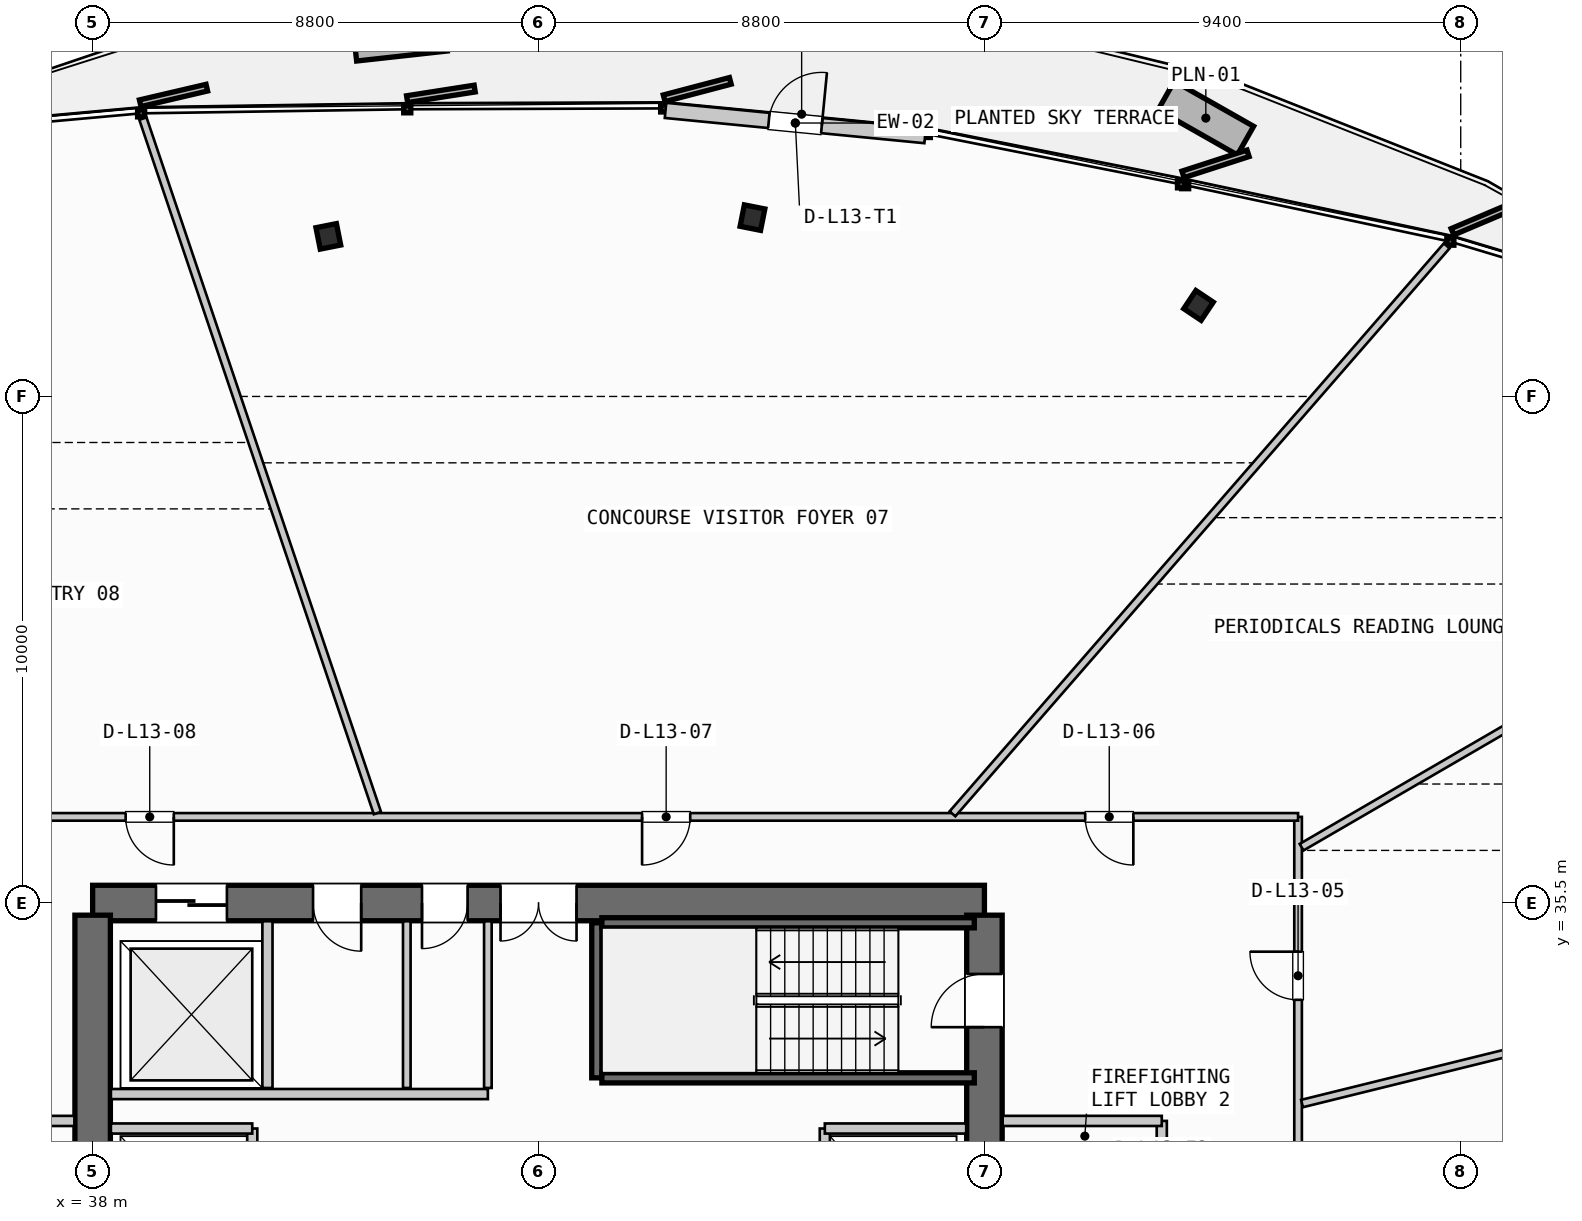
"""IFC4 building model, lengths in metres.
Left out: names, types, materials, properties, quantities, classifications, styles, units other than length and angle.
Written with IfcOpenShell. Run it as: python <this file> out.ifc"""

import sys

from ifc_helpers import new_model, si_unit, direction, frame, frame_2d, origin, origin_2d, place, context, subcontext, project, spatial, rectangle, i_section, extrude, source, transform, mapped, element, fill, save


model = new_model("IFC4")
c1 = context("Model", 3, precision=1e-05, world=origin(), true_north=direction((0.0, 1.0)))
c2 = subcontext(c1, "Body", "Model", "MODEL_VIEW")
j1 = project(units=[si_unit("LENGTHUNIT", "METRE"), si_unit("PLANEANGLEUNIT", "RADIAN")], contexts=[c1])
p1 = place(None, origin())
s1 = spatial("IfcSite", under=j1, at=p1, CompositionType="ELEMENT")
p2 = place(p1, origin())
s2 = spatial("IfcBuilding", under=s1, at=p2, CompositionType="ELEMENT")
p3 = place(p2, frame((0.0, 0.0, 56.2)))
s3 = spatial("IfcBuildingStorey", under=s2, at=p3, CompositionType="ELEMENT", Elevation=56.2)
p4 = place(p3, frame((55.6, 35.5, 0.0), z_axis=(0.0, 0.0, 1.0), x_axis=(-1.0, 0.0, 0.0)))
e1 = element("IfcWall", 1, at=p4, inside=s3, PredefinedType="SHEAR", context=c2, shape_type="SweptSolid", body=[
    extrude(rectangle(XDim=17.6, YDim=0.7, at=frame_2d((8.8, 0.0))), origin(), (0.0, 0.0, 1.0), 3.55),
])
p5 = place(p4, frame((8.05, 0.0, 0.0)))
e2 = element("IfcOpeningElement", 2, at=p5, cuts=e1, PredefinedType="OPENING", context=c2, shape_type="SweptSolid", body=[
    extrude(rectangle(XDim=1.5, YDim=2.2, at=frame_2d((0.75, 1.1))), frame((0.0, 0.36, 0.0), z_axis=(0.0, -1.0, 0.0), x_axis=(1.0, 0.0, 0.0)), (0.0, 0.0, 1.0), 0.72),
])
p6 = place(p4, frame((14.95, 0.0, 0.0)))
e3 = element("IfcOpeningElement", 3, at=p6, cuts=e1, PredefinedType="OPENING", context=c2, shape_type="SweptSolid", body=[
    extrude(rectangle(XDim=1.4, YDim=2.3, at=frame_2d((0.7, 1.15))), frame((0.0, 0.36, 0.0), z_axis=(0.0, -1.0, 0.0), x_axis=(1.0, 0.0, 0.0)), (0.0, 0.0, 1.0), 0.72),
])
p7 = place(p4, frame((12.3, 0.0, 0.0)))
e4 = element("IfcOpeningElement", 4, at=p7, cuts=e1, PredefinedType="OPENING", context=c2, shape_type="SweptSolid", body=[
    extrude(rectangle(XDim=0.95, YDim=2.15, at=frame_2d((0.475, 1.075))), frame((0.0, 0.36, 0.0), z_axis=(0.0, -1.0, 0.0), x_axis=(1.0, 0.0, 0.0)), (0.0, 0.0, 1.0), 0.72),
])
p8 = place(p4, frame((10.2, 0.0, 0.0)))
e5 = element("IfcOpeningElement", 5, at=p8, cuts=e1, PredefinedType="OPENING", context=c2, shape_type="SweptSolid", body=[
    extrude(rectangle(XDim=0.9, YDim=2.15, at=frame_2d((0.45, 1.075))), frame((0.0, 0.36, 0.0), z_axis=(0.0, -1.0, 0.0), x_axis=(1.0, 0.0, 0.0)), (0.0, 0.0, 1.0), 0.72),
])
p9 = place(p3, frame((38.0, 35.26, 0.0), z_axis=(0.0, 0.0, 1.0), x_axis=(0.0, -1.0, 0.0)))
e6 = element("IfcWall", 6, at=p9, inside=s3, PredefinedType="SHEAR", context=c2, shape_type="SweptSolid", body=[
    extrude(rectangle(XDim=14.92, YDim=0.7, at=frame_2d((7.46, 0.0))), origin(), (0.0, 0.0, 1.0), 3.55),
])
p10 = place(p9, frame((5.21, 0.0, 0.0)))
e7 = element("IfcOpeningElement", 7, at=p10, cuts=e6, PredefinedType="OPENING", context=c2, shape_type="SweptSolid", body=[
    extrude(rectangle(XDim=1.1, YDim=2.2, at=frame_2d((0.55, 1.1))), frame((0.0, 0.36, 0.0), z_axis=(0.0, -1.0, 0.0), x_axis=(1.0, 0.0, 0.0)), (0.0, 0.0, 1.0), 0.72),
])
p11 = place(p3, frame((55.6, 20.34, 0.0), z_axis=(0.0, 0.0, 1.0), x_axis=(0.0, 1.0, 0.0)))
e8 = element("IfcWall", 8, at=p11, inside=s3, PredefinedType="SHEAR", context=c2, shape_type="SweptSolid", body=[
    extrude(rectangle(XDim=14.92, YDim=0.7, at=frame_2d((7.46, 0.0))), origin(), (0.0, 0.0, 1.0), 3.55),
])
p12 = place(p11, frame((12.71, 0.0, 0.0)))
e9 = element("IfcOpeningElement", 9, at=p12, cuts=e8, PredefinedType="OPENING", context=c2, shape_type="SweptSolid", body=[
    extrude(rectangle(XDim=1.05, YDim=2.15, at=frame_2d((0.525, 1.075))), frame((0.0, 0.36, 0.0), z_axis=(0.0, -1.0, 0.0), x_axis=(1.0, 0.0, 0.0)), (0.0, 0.0, 1.0), 0.72),
])
p13 = place(p11, frame((8.61, 0.0, 0.0)))
e10 = element("IfcOpeningElement", 10, at=p13, cuts=e8, PredefinedType="OPENING", context=c2, shape_type="SweptSolid", body=[
    extrude(rectangle(XDim=1.1, YDim=2.2, at=frame_2d((0.55, 1.1))), frame((0.0, 0.36, 0.0), z_axis=(0.0, -1.0, 0.0), x_axis=(1.0, 0.0, 0.0)), (0.0, 0.0, 1.0), 0.72),
])
m1 = source(origin(), c2, "Body", "SweptSolid", [
    extrude(i_section(OverallWidth=0.412, OverallDepth=0.431, WebThickness=0.042, FlangeThickness=0.068, FilletRadius=0.015, at=origin_2d()), origin(), (0.0, 0.0, 1.0), 3.55),
])
for number, where, z_axis, x_axis in (
    (11, (59.825, 47.293, 0.0), (0.0, 0.0, 1.0), (0.556, 0.831, 0.0)),
    (12, (51.022, 49.026, 0.0), (0.0, 0.0, 1.0), (0.195, 0.981, 0.0)),
    (13, (42.652, 48.656, 0.0), (0.0, 0.0, 1.0), (-0.195, 0.981, 0.0)),
):
    element("IfcColumn", number, at=place(p3, frame(where, z_axis=z_axis, x_axis=x_axis)), inside=s3, PredefinedType="COLUMN", context=c2, shape_type="MappedRepresentation", body=[
        mapped(m1, transform((0.0, 0.0, 0.0), scale=1.0)),
    ])
p14 = place(p3, frame((49.306, 51.142, 0.0), z_axis=(0.0, 0.0, 1.0), x_axis=(0.995308557382, -0.096751618082, 0.0)))
e14 = element("IfcWall", 14, at=p14, inside=s3, PredefinedType="SOLIDWALL", context=c2, shape_type="SweptSolid", body=[
    extrude(rectangle(XDim=5.148, YDim=0.3, at=frame_2d((2.574, 0.0))), origin(), (0.0, 0.0, 1.0), 2.925),
])
p15 = place(p14, frame((2.049, 0.0, 0.0)))
e15 = element("IfcOpeningElement", 15, at=p15, cuts=e14, PredefinedType="OPENING", context=c2, shape_type="SweptSolid", body=[
    extrude(rectangle(XDim=1.05, YDim=2.2, at=frame_2d((0.525, 1.1))), frame((0.0, 0.16, 0.0), z_axis=(0.0, -1.0, 0.0), x_axis=(1.0, 0.0, 0.0)), (0.0, 0.0, 1.0), 0.32),
])
p16 = place(p3, frame((47.95, 32.05, 0.0), z_axis=(0.0, 0.0, 1.0), x_axis=(0.0, 1.0, 0.0)))
e16 = element("IfcWall", 16, at=p16, inside=s3, PredefinedType="SHEAR", context=c2, shape_type="SweptSolid", body=[
    extrude(rectangle(XDim=3.06, YDim=0.2, at=frame_2d((1.53, 0.0))), origin(), (0.0, 0.0, 1.0), 3.55),
])
for number, where, z_axis, x_axis in (
    (17, (48.05, 35.11, 0.0), (0.0, 0.0, 1.0), (1.0, 0.0, 0.0)),
    (18, (55.4, 32.05, 0.0), (0.0, 0.0, 1.0), (-1.0, 0.0, 0.0)),
):
    element("IfcWall", number, at=place(p3, frame(where, z_axis=z_axis, x_axis=x_axis)), inside=s3, PredefinedType="SHEAR", context=c2, shape_type="SweptSolid", body=[
        extrude(rectangle(XDim=7.35, YDim=0.2, at=frame_2d((3.675, 0.0))), origin(), (0.0, 0.0, 1.0), 3.55),
    ])
p17 = place(p3, frame((41.15, 27.95, 0.0), z_axis=(0.0, 0.0, 1.0), x_axis=(0.0, 1.0, 0.0)))
e19 = element("IfcWall", 19, at=p17, inside=s3, PredefinedType="PARTITIONING", context=c2, shape_type="SweptSolid", body=[
    extrude(rectangle(XDim=3.1, YDim=0.2, at=frame_2d((1.55, 0.0))), origin(), (0.0, 0.0, 1.0), 2.645),
])
p18 = place(p3, frame((38.36, 31.05, 0.0), z_axis=(0.0, 0.0, 1.0), x_axis=(1.0, 0.0, 0.0)))
e20 = element("IfcWall", 20, at=p18, inside=s3, PredefinedType="PARTITIONING", context=c2, shape_type="SweptSolid", body=[
    extrude(rectangle(XDim=2.79, YDim=0.2, at=frame_2d((1.395, 0.0))), origin(), (0.0, 0.0, 1.0), 2.645),
])
p19 = place(p3, frame((34.5, 31.2, 0.0), z_axis=(0.0, 0.0, 1.0), x_axis=(1.0, 0.0, 0.0)))
e21 = element("IfcWall", 21, at=p19, inside=s3, PredefinedType="PARTITIONING", context=c2, shape_type="SweptSolid", body=[
    extrude(rectangle(XDim=3.14, YDim=0.2, at=frame_2d((1.57, 0.0))), origin(), (0.0, 0.0, 1.0), 2.645),
])
p20 = place(p3, frame((52.45, 27.95, 0.0), z_axis=(0.0, 0.0, 1.0), x_axis=(0.0, 1.0, 0.0)))
e22 = element("IfcWall", 22, at=p20, inside=s3, PredefinedType="PARTITIONING", context=c2, shape_type="SweptSolid", body=[
    extrude(rectangle(XDim=3.1, YDim=0.2, at=frame_2d((1.55, 0.0))), origin(), (0.0, 0.0, 1.0), 2.645),
])
p21 = place(p3, frame((52.45, 31.05, 0.0), z_axis=(0.0, 0.0, 1.0), x_axis=(1.0, 0.0, 0.0)))
e23 = element("IfcWall", 23, at=p21, inside=s3, PredefinedType="PARTITIONING", context=c2, shape_type="SweptSolid", body=[
    extrude(rectangle(XDim=2.79, YDim=0.2, at=frame_2d((1.395, 0.0))), origin(), (0.0, 0.0, 1.0), 2.645),
])
p22 = place(p3, frame((59.1, 26.8, 0.0), z_axis=(0.0, 0.0, 1.0), x_axis=(0.0, 1.0, 0.0)))
e24 = element("IfcWall", 24, at=p22, inside=s3, PredefinedType="PARTITIONING", context=c2, shape_type="SweptSolid", body=[
    extrude(rectangle(XDim=4.4, YDim=0.2, at=frame_2d((2.2, 0.0))), origin(), (0.0, 0.0, 1.0), 2.645),
])
p23 = place(p22, frame((1.65, 0.0, 0.0)))
e25 = element("IfcOpeningElement", 25, at=p23, cuts=e24, PredefinedType="OPENING", context=c2, shape_type="SweptSolid", body=[
    extrude(rectangle(XDim=1.05, YDim=2.15, at=frame_2d((0.525, 1.075))), frame((0.0, 0.11, 0.0), z_axis=(0.0, -1.0, 0.0), x_axis=(1.0, 0.0, 0.0)), (0.0, 0.0, 1.0), 0.22),
])
p24 = place(p3, frame((55.96, 31.2, 0.0), z_axis=(0.0, 0.0, 1.0), x_axis=(1.0, 0.0, 0.0)))
e26 = element("IfcWall", 26, at=p24, inside=s3, PredefinedType="PARTITIONING", context=c2, shape_type="SweptSolid", body=[
    extrude(rectangle(XDim=3.14, YDim=0.2, at=frame_2d((1.57, 0.0))), origin(), (0.0, 0.0, 1.0), 2.645),
])
p25 = place(p3, frame((41.45, 31.85, 0.0), z_axis=(0.0, 0.0, 1.0), x_axis=(0.0, 1.0, 0.0)))
e27 = element("IfcWall", 27, at=p25, inside=s3, PredefinedType="PARTITIONING", context=c2, shape_type="SweptSolid", body=[
    extrude(rectangle(XDim=3.29, YDim=0.2, at=frame_2d((1.645, 0.0))), origin(), (0.0, 0.0, 1.0), 2.645),
])
p26 = place(p3, frame((38.36, 31.73, 0.0), z_axis=(0.0, 0.0, 1.0), x_axis=(1.0, 0.0, 0.0)))
e28 = element("IfcWall", 28, at=p26, inside=s3, PredefinedType="PARTITIONING", context=c2, shape_type="SweptSolid", body=[
    extrude(rectangle(XDim=7.44, YDim=0.2, at=frame_2d((3.72, 0.0))), origin(), (0.0, 0.0, 1.0), 2.645),
])
p27 = place(p3, frame((45.8, 31.85, 0.0), z_axis=(0.0, 0.0, 1.0), x_axis=(0.0, 1.0, 0.0)))
e29 = element("IfcWall", 29, at=p27, inside=s3, PredefinedType="PARTITIONING", context=c2, shape_type="SweptSolid", body=[
    extrude(rectangle(XDim=3.29, YDim=0.15, at=frame_2d((1.645, 0.0))), origin(), (0.0, 0.0, 1.0), 2.645),
])
p28 = place(p3, frame((44.2, 31.85, 0.0), z_axis=(0.0, 0.0, 1.0), x_axis=(0.0, 1.0, 0.0)))
e30 = element("IfcWall", 30, at=p28, inside=s3, PredefinedType="PLUMBINGWALL", context=c2, shape_type="SweptSolid", body=[
    extrude(rectangle(XDim=3.29, YDim=0.15, at=frame_2d((1.645, 0.0))), origin(), (0.0, 0.0, 1.0), 2.645),
])
p29 = place(p3, frame((61.79, 17.98, 0.0), z_axis=(0.0, 0.0, 1.0), x_axis=(0.0, 1.0, 0.0)))
e31 = element("IfcWall", 31, at=p29, inside=s3, PredefinedType="PARTITIONING", context=c2, shape_type="SweptSolid", body=[
    extrude(rectangle(XDim=19.22, YDim=0.15, at=frame_2d((9.61, 0.0))), origin(), (0.0, 0.0, 1.0), 2.645),
])
p30 = place(p29, frame((2.332, 0.0, 0.0)))
e32 = element("IfcOpeningElement", 32, at=p30, cuts=e31, PredefinedType="OPENING", context=c2, shape_type="SweptSolid", body=[
    extrude(rectangle(XDim=0.95, YDim=2.15, at=frame_2d((0.475, 1.075))), frame((0.0, 0.085, 0.0), z_axis=(0.0, -1.0, 0.0), x_axis=(1.0, 0.0, 0.0)), (0.0, 0.0, 1.0), 0.17),
])
p31 = place(p29, frame((8.811, 0.0, 0.0)))
e33 = element("IfcOpeningElement", 33, at=p31, cuts=e31, PredefinedType="OPENING", context=c2, shape_type="SweptSolid", body=[
    extrude(rectangle(XDim=0.95, YDim=2.15, at=frame_2d((0.475, 1.075))), frame((0.0, 0.085, 0.0), z_axis=(0.0, -1.0, 0.0), x_axis=(1.0, 0.0, 0.0)), (0.0, 0.0, 1.0), 0.17),
])
p32 = place(p29, frame((15.61, 0.0, 0.0)))
e34 = element("IfcOpeningElement", 34, at=p32, cuts=e31, PredefinedType="OPENING", context=c2, shape_type="SweptSolid", body=[
    extrude(rectangle(XDim=0.95, YDim=2.15, at=frame_2d((0.475, 1.075))), frame((0.0, 0.085, 0.0), z_axis=(0.0, -1.0, 0.0), x_axis=(1.0, 0.0, 0.0)), (0.0, 0.0, 1.0), 0.17),
])
p33 = place(p3, frame((61.79, 37.2, 0.0), z_axis=(0.0, 0.0, 1.0), x_axis=(-1.0, 0.0, 0.0)))
e35 = element("IfcWall", 35, at=p33, inside=s3, PredefinedType="PARTITIONING", context=c2, shape_type="SweptSolid", body=[
    extrude(rectangle(XDim=29.98, YDim=0.15, at=frame_2d((14.99, 0.0))), origin(), (0.0, 0.0, 1.0), 2.645),
])
p34 = place(p33, frame((3.251, 0.0, 0.0)))
e36 = element("IfcOpeningElement", 36, at=p34, cuts=e35, PredefinedType="OPENING", context=c2, shape_type="SweptSolid", body=[
    extrude(rectangle(XDim=0.95, YDim=2.15, at=frame_2d((0.475, 1.075))), frame((0.0, 0.085, 0.0), z_axis=(0.0, -1.0, 0.0), x_axis=(1.0, 0.0, 0.0)), (0.0, 0.0, 1.0), 0.17),
])
p35 = place(p33, frame((11.996, 0.0, 0.0)))
e37 = element("IfcOpeningElement", 37, at=p35, cuts=e35, PredefinedType="OPENING", context=c2, shape_type="SweptSolid", body=[
    extrude(rectangle(XDim=0.95, YDim=2.15, at=frame_2d((0.475, 1.075))), frame((0.0, 0.085, 0.0), z_axis=(0.0, -1.0, 0.0), x_axis=(1.0, 0.0, 0.0)), (0.0, 0.0, 1.0), 0.17),
])
p36 = place(p33, frame((22.188, 0.0, 0.0)))
e38 = element("IfcOpeningElement", 38, at=p36, cuts=e35, PredefinedType="OPENING", context=c2, shape_type="SweptSolid", body=[
    extrude(rectangle(XDim=0.95, YDim=2.15, at=frame_2d((0.475, 1.075))), frame((0.0, 0.085, 0.0), z_axis=(0.0, -1.0, 0.0), x_axis=(1.0, 0.0, 0.0)), (0.0, 0.0, 1.0), 0.17),
])
p37 = place(p3, frame((61.868, 31.543, 0.0), z_axis=(0.0, 0.0, 1.0), x_axis=(0.970877515326, 0.23957639749, 0.0)))
e39 = element("IfcWall", 39, at=p37, inside=s3, PredefinedType="PARTITIONING", context=c2, shape_type="SweptSolid", body=[
    extrude(rectangle(XDim=17.885, YDim=0.15, at=frame_2d((8.943, 0.0))), origin(), (0.0, 0.0, 1.0), 2.645),
])
p38 = place(p3, frame((61.859, 36.602, 0.0), z_axis=(0.0, 0.0, 1.0), x_axis=(0.864825995499, 0.502071705544, 0.0)))
e40 = element("IfcWall", 40, at=p38, inside=s3, PredefinedType="PARTITIONING", context=c2, shape_type="SweptSolid", body=[
    extrude(rectangle(XDim=14.03, YDim=0.15, at=frame_2d((7.015, 0.0))), origin(), (0.0, 0.0, 1.0), 2.645),
])
p39 = place(p3, frame((54.969, 37.26, 0.0), z_axis=(0.0, 0.0, 1.0), x_axis=(0.656478076952, 0.754345103041, 0.0)))
e41 = element("IfcWall", 41, at=p39, inside=s3, PredefinedType="PARTITIONING", context=c2, shape_type="SweptSolid", body=[
    extrude(rectangle(XDim=14.858, YDim=0.15, at=frame_2d((7.429, 0.0))), origin(), (0.0, 0.0, 1.0), 2.645),
])
p40 = place(p3, frame((43.62, 37.276, 0.0), z_axis=(0.0, 0.0, 1.0), x_axis=(-0.319942102515, 0.947437096085, 0.0)))
e42 = element("IfcWall", 42, at=p40, inside=s3, PredefinedType="PARTITIONING", context=c2, shape_type="SweptSolid", body=[
    extrude(rectangle(XDim=14.464, YDim=0.15, at=frame_2d((7.232, 0.0))), origin(), (0.0, 0.0, 1.0), 2.645),
])
m2 = source(origin(), c2, "Body", "SweptSolid", [
    extrude(rectangle(XDim=1.05, YDim=2.2, at=frame_2d((0.525, 1.1))), frame((0.0, 0.025, 0.0), z_axis=(0.0, -1.0, 0.0), x_axis=(1.0, 0.0, 0.0)), (0.0, 0.0, 1.0), 0.05),
])
p41 = place(p15, origin())
e43 = element("IfcDoor", 43, at=p41, inside=s3, OperationType="SINGLE_SWING_RIGHT", PredefinedType="DOOR", context=c2, shape_type="MappedRepresentation", body=[
    mapped(m2, transform((0.0, 0.0, 0.0), scale=1.0)),
])
fill(e15, e43)
m3 = source(origin(), c2, "Body", "SweptSolid", [
    extrude(rectangle(XDim=1.05, YDim=2.15, at=frame_2d((0.525, 1.075))), frame((0.0, 0.025, 0.0), z_axis=(0.0, -1.0, 0.0), x_axis=(1.0, 0.0, 0.0)), (0.0, 0.0, 1.0), 0.05),
])
p42 = place(p12, origin())
e44 = element("IfcDoor", 44, at=p42, inside=s3, OperationType="SINGLE_SWING_LEFT", PredefinedType="DOOR", context=c2, shape_type="MappedRepresentation", body=[
    mapped(m3, transform((0.0, 0.0, 0.0), scale=1.0)),
])
fill(e9, e44)
m4 = source(origin(), c2, "Body", "SweptSolid", [
    extrude(rectangle(XDim=1.5, YDim=2.2, at=frame_2d((0.75, 1.1))), frame((0.0, 0.025, 0.0), z_axis=(0.0, -1.0, 0.0), x_axis=(1.0, 0.0, 0.0)), (0.0, 0.0, 1.0), 0.05),
])
p43 = place(p5, origin())
e45 = element("IfcDoor", 45, at=p43, inside=s3, OperationType="DOUBLE_DOOR_SINGLE_SWING", PredefinedType="DOOR", context=c2, shape_type="MappedRepresentation", body=[
    mapped(m4, transform((0.0, 0.0, 0.0), scale=1.0)),
])
fill(e2, e45)
m5 = source(origin(), c2, "Body", "SweptSolid", [
    extrude(rectangle(XDim=1.4, YDim=2.3, at=frame_2d((0.7, 1.15))), frame((0.0, 0.025, 0.0), z_axis=(0.0, -1.0, 0.0), x_axis=(1.0, 0.0, 0.0)), (0.0, 0.0, 1.0), 0.05),
])
p44 = place(p6, origin())
e46 = element("IfcDoor", 46, at=p44, inside=s3, OperationType="SLIDING_TO_RIGHT", PredefinedType="DOOR", context=c2, shape_type="MappedRepresentation", body=[
    mapped(m5, transform((0.0, 0.0, 0.0), scale=1.0)),
])
fill(e3, e46)
m6 = source(origin(), c2, "Body", "SweptSolid", [
    extrude(rectangle(XDim=0.95, YDim=2.15, at=frame_2d((0.475, 1.075))), frame((0.0, 0.025, 0.0), z_axis=(0.0, -1.0, 0.0), x_axis=(1.0, 0.0, 0.0)), (0.0, 0.0, 1.0), 0.05),
])
p45 = place(p7, origin())
e47 = element("IfcDoor", 47, at=p45, inside=s3, OperationType="SINGLE_SWING_LEFT", PredefinedType="DOOR", context=c2, shape_type="MappedRepresentation", body=[
    mapped(m6, transform((0.0, 0.0, 0.0), scale=1.0)),
])
fill(e4, e47)
m7 = source(origin(), c2, "Body", "SweptSolid", [
    extrude(rectangle(XDim=0.9, YDim=2.15, at=frame_2d((0.45, 1.075))), frame((0.0, 0.025, 0.0), z_axis=(0.0, -1.0, 0.0), x_axis=(1.0, 0.0, 0.0)), (0.0, 0.0, 1.0), 0.05),
])
p46 = place(p8, origin())
e48 = element("IfcDoor", 48, at=p46, inside=s3, OperationType="SINGLE_SWING_RIGHT", PredefinedType="DOOR", context=c2, shape_type="MappedRepresentation", body=[
    mapped(m7, transform((0.0, 0.0, 0.0), scale=1.0)),
])
fill(e5, e48)
p47 = place(p32, origin())
e49 = element("IfcDoor", 49, at=p47, inside=s3, OperationType="SINGLE_SWING_RIGHT", PredefinedType="DOOR", context=c2, shape_type="MappedRepresentation", body=[
    mapped(m6, transform((0.0, 0.0, 0.0), scale=1.0)),
])
fill(e34, e49)
p48 = place(p34, origin())
e50 = element("IfcDoor", 50, at=p48, inside=s3, OperationType="SINGLE_SWING_LEFT", PredefinedType="DOOR", context=c2, shape_type="MappedRepresentation", body=[
    mapped(m6, transform((0.0, 0.0, 0.0), scale=1.0)),
])
fill(e36, e50)
p49 = place(p35, origin())
e51 = element("IfcDoor", 51, at=p49, inside=s3, OperationType="SINGLE_SWING_RIGHT", PredefinedType="DOOR", context=c2, shape_type="MappedRepresentation", body=[
    mapped(m6, transform((0.0, 0.0, 0.0), scale=1.0)),
])
fill(e37, e51)
p50 = place(p36, origin())
e52 = element("IfcDoor", 52, at=p50, inside=s3, OperationType="SINGLE_SWING_LEFT", PredefinedType="DOOR", context=c2, shape_type="MappedRepresentation", body=[
    mapped(m6, transform((0.0, 0.0, 0.0), scale=1.0)),
])
fill(e38, e52)
save(model, sys.argv[1])
